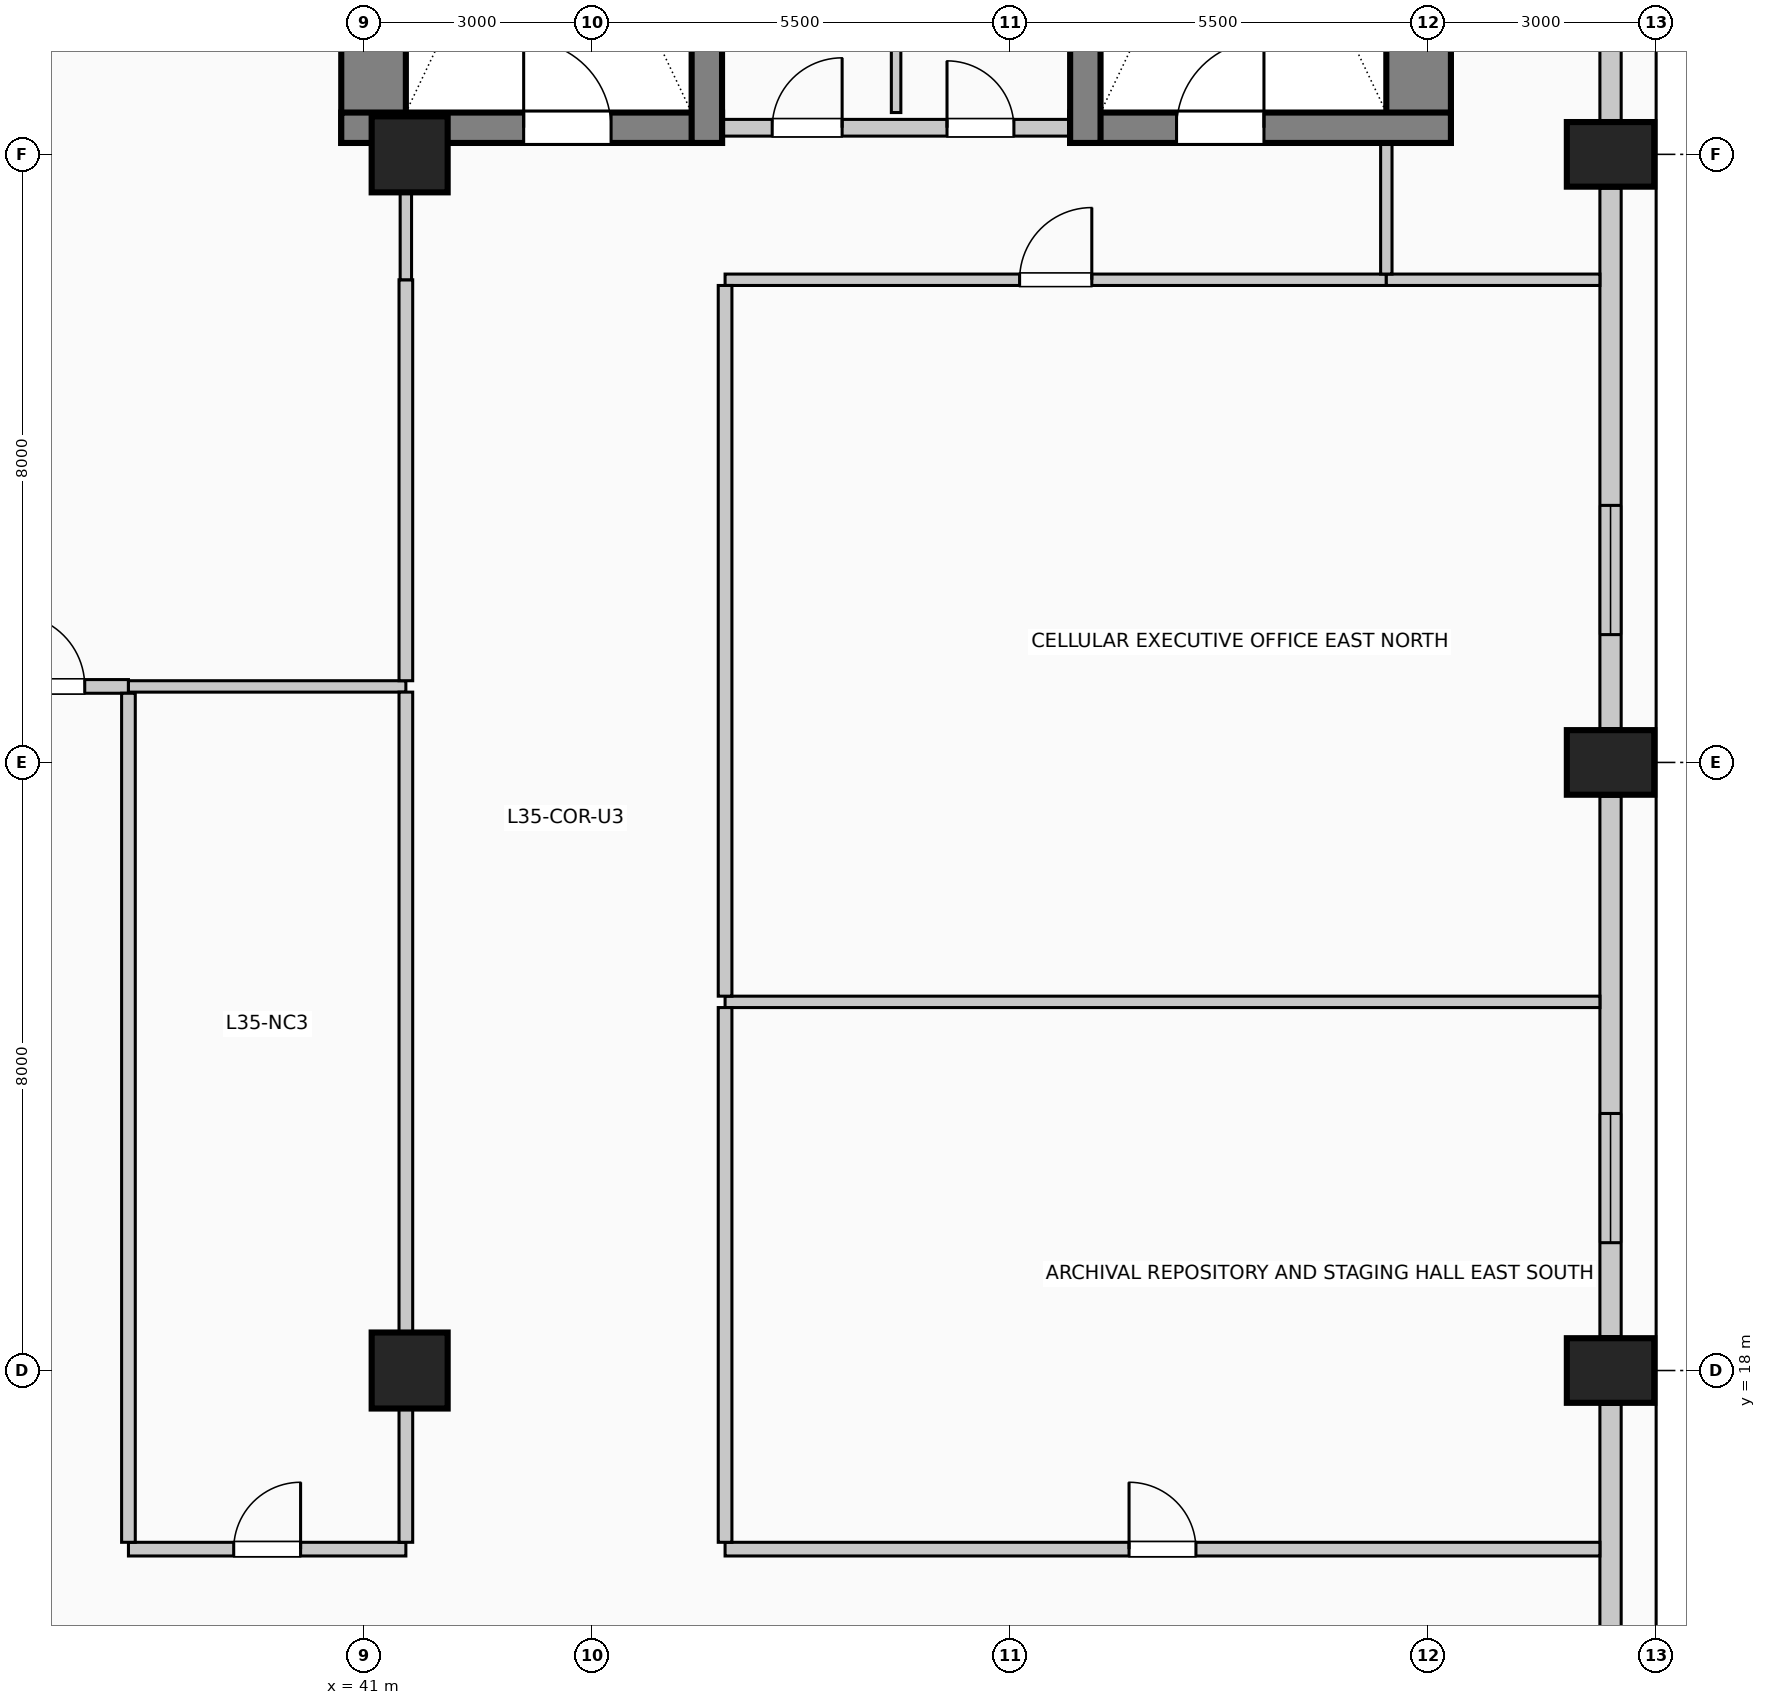
"""IFC4 building model, lengths in metres.
Left out: names, types, materials, properties, quantities, classifications, styles, units other than length and angle.
Written with IfcOpenShell. Run it as: python <this file> out.ifc"""

import sys

from ifc_helpers import new_model, si_unit, direction, frame, frame_2d, origin, origin_2d, place, context, subcontext, project, spatial, rectangle, circle, extrude, element, fill, save


model = new_model("IFC4")
c1 = context("Model", 3, precision=1e-05, world=origin(), true_north=direction((0.0, 1.0)))
c2 = subcontext(c1, "Body", "Model", "MODEL_VIEW")
j1 = project(units=[si_unit("LENGTHUNIT", "METRE"), si_unit("PLANEANGLEUNIT", "RADIAN")], contexts=[c1])
p1 = place(None, origin())
s1 = spatial("IfcSite", under=j1, at=p1, CompositionType="ELEMENT")
p2 = place(p1, origin())
s2 = spatial("IfcBuilding", under=s1, at=p2, CompositionType="ELEMENT")
p3 = place(p2, frame((0.0, 0.0, 144.6)))
s3 = spatial("IfcBuildingStorey", under=s2, at=p3, CompositionType="ELEMENT", Elevation=144.6)
for number, where, z_axis, x_axis in (
    (1, (41.125, 34.15, 0.0), (0.0, 0.0, 1.0), (0.0, 1.0, 0.0)),
    (2, (54.875, 34.15, 0.0), (0.0, 0.0, 1.0), (0.0, 1.0, 0.0)),
):
    element("IfcWall", number, at=place(p3, frame(where, z_axis=z_axis, x_axis=x_axis)), inside=s3, PredefinedType="SHEAR", context=c2, shape_type="SweptSolid", body=[
        extrude(rectangle(XDim=9.13, YDim=0.85, at=frame_2d((4.565, 0.0))), origin(), (0.0, 0.0, 1.0), 4.0),
    ])
p4 = place(p3, frame((40.7, 34.35, 0.0), z_axis=(0.0, 0.0, 1.0), x_axis=(1.0, 0.0, 0.0)))
e3 = element("IfcWall", 3, at=p4, inside=s3, PredefinedType="SHEAR", context=c2, shape_type="SweptSolid", body=[
    extrude(rectangle(XDim=5.01, YDim=0.4, at=frame_2d((2.505, 0.0))), origin(), (0.0, 0.0, 1.0), 4.0),
])
p5 = place(p4, frame((2.4, 0.0, 0.0)))
e4 = element("IfcOpeningElement", 4, at=p5, cuts=e3, PredefinedType="OPENING", context=c2, shape_type="SweptSolid", body=[
    extrude(rectangle(XDim=1.15, YDim=2.2, at=frame_2d((0.575, 1.1))), frame((0.0, 0.21, 0.0), z_axis=(0.0, -1.0, 0.0), x_axis=(1.0, 0.0, 0.0)), (0.0, 0.0, 1.0), 0.42),
])
p6 = place(p3, frame((45.51, 34.15, 0.0), z_axis=(0.0, 0.0, 1.0), x_axis=(0.0, 1.0, 0.0)))
e5 = element("IfcWall", 5, at=p6, inside=s3, PredefinedType="SHEAR", context=c2, shape_type="SweptSolid", body=[
    extrude(rectangle(XDim=9.13, YDim=0.4, at=frame_2d((4.565, 0.0))), origin(), (0.0, 0.0, 1.0), 4.0),
])
p7 = place(p3, frame((50.29, 34.35, 0.0), z_axis=(0.0, 0.0, 1.0), x_axis=(1.0, 0.0, 0.0)))
e6 = element("IfcWall", 6, at=p7, inside=s3, PredefinedType="SHEAR", context=c2, shape_type="SweptSolid", body=[
    extrude(rectangle(XDim=5.01, YDim=0.4, at=frame_2d((2.505, 0.0))), origin(), (0.0, 0.0, 1.0), 4.0),
])
p8 = place(p7, frame((1.4, 0.0, 0.0)))
e7 = element("IfcOpeningElement", 7, at=p8, cuts=e6, PredefinedType="OPENING", context=c2, shape_type="SweptSolid", body=[
    extrude(rectangle(XDim=1.15, YDim=2.2, at=frame_2d((0.575, 1.1))), frame((0.0, 0.21, 0.0), z_axis=(0.0, -1.0, 0.0), x_axis=(1.0, 0.0, 0.0)), (0.0, 0.0, 1.0), 0.42),
])
p9 = place(p3, frame((50.49, 34.15, 0.0), z_axis=(0.0, 0.0, 1.0), x_axis=(0.0, 1.0, 0.0)))
e8 = element("IfcWall", 8, at=p9, inside=s3, PredefinedType="SHEAR", context=c2, shape_type="SweptSolid", body=[
    extrude(rectangle(XDim=9.13, YDim=0.4, at=frame_2d((4.565, 0.0))), origin(), (0.0, 0.0, 1.0), 4.0),
])
for number, where, z_axis, x_axis in (
    (9, (57.4, 18.0, 0.0), (0.0, 0.0, 1.0), (0.0, 1.0, 0.0)),
    (10, (57.4, 26.0, 0.0), (0.0, 0.0, 1.0), (0.0, 1.0, 0.0)),
    (11, (57.4, 34.0, 0.0), (0.0, 0.0, 1.0), (0.0, 1.0, 0.0)),
):
    element("IfcColumn", number, at=place(p3, frame(where, z_axis=z_axis, x_axis=x_axis)), inside=s3, PredefinedType="COLUMN", context=c2, shape_type="SweptSolid", body=[
        extrude(rectangle(XDim=0.85, YDim=1.15, at=origin_2d()), origin(), (0.0, 0.0, 1.0), 4.0),
    ])
for number, where, z_axis, x_axis in (
    (12, (41.6, 18.0, 0.0), (0.0, 0.0, 1.0), (1.0, 0.0, 0.0)),
    (13, (41.6, 34.0, 0.0), (0.0, 0.0, 1.0), (1.0, 0.0, 0.0)),
):
    element("IfcColumn", number, at=place(p3, frame(where, z_axis=z_axis, x_axis=x_axis)), inside=s3, PredefinedType="COLUMN", context=c2, shape_type="SweptSolid", body=[
        extrude(circle(Radius=0.5, at=origin_2d()), origin(), (0.0, 0.0, 1.0), 4.0),
    ])
p10 = place(p3, frame((57.4, 17.555, 0.0), z_axis=(0.0, 0.0, 1.0), x_axis=(0.0, -1.0, 0.0)))
e14 = element("IfcWall", 14, at=p10, inside=s3, PredefinedType="SOLIDWALL", context=c2, shape_type="SweptSolid", body=[
    extrude(rectangle(XDim=7.11, YDim=0.28, at=frame_2d((3.555, 0.0))), origin(), (0.0, 0.0, 1.0), 2.875),
])
p11 = place(p3, frame((57.4, 25.555, 0.0), z_axis=(0.0, 0.0, 1.0), x_axis=(0.0, -1.0, 0.0)))
e15 = element("IfcWall", 15, at=p11, inside=s3, PredefinedType="SOLIDWALL", context=c2, shape_type="SweptSolid", body=[
    extrude(rectangle(XDim=7.11, YDim=0.28, at=frame_2d((3.555, 0.0))), origin(), (0.0, 0.0, 1.0), 2.875),
])
p12 = place(p11, frame((4.173, 0.0, 0.5)))
e16 = element("IfcOpeningElement", 16, at=p12, cuts=e15, PredefinedType="OPENING", context=c2, shape_type="SweptSolid", body=[
    extrude(rectangle(XDim=1.7, YDim=1.95, at=frame_2d((0.85, 0.975))), frame((0.0, 0.15, 0.0), z_axis=(0.0, -1.0, 0.0), x_axis=(1.0, 0.0, 0.0)), (0.0, 0.0, 1.0), 0.3),
])
p13 = place(p3, frame((57.4, 33.555, 0.0), z_axis=(0.0, 0.0, 1.0), x_axis=(0.0, -1.0, 0.0)))
e17 = element("IfcWall", 17, at=p13, inside=s3, PredefinedType="SOLIDWALL", context=c2, shape_type="SweptSolid", body=[
    extrude(rectangle(XDim=7.11, YDim=0.28, at=frame_2d((3.555, 0.0))), origin(), (0.0, 0.0, 1.0), 2.875),
])
p14 = place(p13, frame((4.173, 0.0, 0.5)))
e18 = element("IfcOpeningElement", 18, at=p14, cuts=e17, PredefinedType="OPENING", context=c2, shape_type="SweptSolid", body=[
    extrude(rectangle(XDim=1.7, YDim=1.95, at=frame_2d((0.85, 0.975))), frame((0.0, 0.15, 0.0), z_axis=(0.0, -1.0, 0.0), x_axis=(1.0, 0.0, 0.0)), (0.0, 0.0, 1.0), 0.3),
])
p15 = place(p3, frame((57.4, 41.955, 0.0), z_axis=(0.0, 0.0, 1.0), x_axis=(0.0, -1.0, 0.0)))
e19 = element("IfcWall", 19, at=p15, inside=s3, PredefinedType="SOLIDWALL", context=c2, shape_type="SweptSolid", body=[
    extrude(rectangle(XDim=7.51, YDim=0.28, at=frame_2d((3.755, 0.0))), origin(), (0.0, 0.0, 1.0), 2.875),
])
p16 = place(p3, frame((45.72, 34.35, 0.0), z_axis=(0.0, 0.0, 1.0), x_axis=(1.0, 0.0, 0.0)))
e20 = element("IfcWall", 20, at=p16, inside=s3, PredefinedType="PARTITIONING", context=c2, shape_type="SweptSolid", body=[
    extrude(rectangle(XDim=4.56, YDim=0.22, at=frame_2d((2.28, 0.0))), origin(), (0.0, 0.0, 1.0), 3.725),
])
p17 = place(p16, frame((0.65, 0.0, 0.0)))
e21 = element("IfcOpeningElement", 21, at=p17, cuts=e20, PredefinedType="OPENING", context=c2, shape_type="SweptSolid", body=[
    extrude(rectangle(XDim=0.92, YDim=2.1, at=frame_2d((0.46, 1.05))), frame((0.0, 0.12, 0.0), z_axis=(0.0, -1.0, 0.0), x_axis=(1.0, 0.0, 0.0)), (0.0, 0.0, 1.0), 0.24),
])
p18 = place(p16, frame((2.95, 0.0, 0.0)))
e22 = element("IfcOpeningElement", 22, at=p18, cuts=e20, PredefinedType="OPENING", context=c2, shape_type="SweptSolid", body=[
    extrude(rectangle(XDim=0.88, YDim=2.1, at=frame_2d((0.44, 1.05))), frame((0.0, 0.12, 0.0), z_axis=(0.0, -1.0, 0.0), x_axis=(1.0, 0.0, 0.0)), (0.0, 0.0, 1.0), 0.24),
])
p19 = place(p3, frame((37.9, 15.65, 0.0), z_axis=(0.0, 0.0, 1.0), x_axis=(1.0, 0.0, 0.0)))
e23 = element("IfcWall", 23, at=p19, inside=s3, PredefinedType="PARTITIONING", context=c2, shape_type="SweptSolid", body=[
    extrude(rectangle(XDim=3.65, YDim=0.18, at=frame_2d((1.825, 0.0))), origin(), (0.0, 0.0, 1.0), 3.725),
])
p20 = place(p19, frame((1.385, 0.0, 0.0)))
e24 = element("IfcOpeningElement", 24, at=p20, cuts=e23, PredefinedType="OPENING", context=c2, shape_type="SweptSolid", body=[
    extrude(rectangle(XDim=0.88, YDim=2.1, at=frame_2d((0.44, 1.05))), frame((0.0, 0.1, 0.0), z_axis=(0.0, -1.0, 0.0), x_axis=(1.0, 0.0, 0.0)), (0.0, 0.0, 1.0), 0.2),
])
p21 = place(p3, frame((45.75, 15.65, 0.0), z_axis=(0.0, 0.0, 1.0), x_axis=(1.0, 0.0, 0.0)))
e25 = element("IfcWall", 25, at=p21, inside=s3, PredefinedType="PARTITIONING", context=c2, shape_type="SweptSolid", body=[
    extrude(rectangle(XDim=11.51, YDim=0.18, at=frame_2d((5.755, 0.0))), origin(), (0.0, 0.0, 1.0), 3.725),
])
p22 = place(p21, frame((5.315, 0.0, 0.0)))
e26 = element("IfcOpeningElement", 26, at=p22, cuts=e25, PredefinedType="OPENING", context=c2, shape_type="SweptSolid", body=[
    extrude(rectangle(XDim=0.88, YDim=2.1, at=frame_2d((0.44, 1.05))), frame((0.0, 0.1, 0.0), z_axis=(0.0, -1.0, 0.0), x_axis=(1.0, 0.0, 0.0)), (0.0, 0.0, 1.0), 0.2),
])
p23 = place(p3, frame((45.75, 22.85, 0.0), z_axis=(0.0, 0.0, 1.0), x_axis=(1.0, 0.0, 0.0)))
e27 = element("IfcWall", 27, at=p23, inside=s3, PredefinedType="PARTITIONING", context=c2, shape_type="SweptSolid", body=[
    extrude(rectangle(XDim=11.51, YDim=0.15, at=frame_2d((5.755, 0.0))), origin(), (0.0, 0.0, 1.0), 3.725),
])
p24 = place(p3, frame((35.8, 27.0, 0.0), z_axis=(0.0, 0.0, 1.0), x_axis=(1.0, 0.0, 0.0)))
e28 = element("IfcWall", 28, at=p24, inside=s3, PredefinedType="PARTITIONING", context=c2, shape_type="SweptSolid", body=[
    extrude(rectangle(XDim=2.1, YDim=0.18, at=frame_2d((1.05, 0.0))), origin(), (0.0, 0.0, 1.0), 3.725),
])
p25 = place(p24, frame((0.575, 0.0, 0.0)))
e29 = element("IfcOpeningElement", 29, at=p25, cuts=e28, PredefinedType="OPENING", context=c2, shape_type="SweptSolid", body=[
    extrude(rectangle(XDim=0.95, YDim=2.15, at=frame_2d((0.475, 1.075))), frame((0.0, 0.1, 0.0), z_axis=(0.0, -1.0, 0.0), x_axis=(1.0, 0.0, 0.0)), (0.0, 0.0, 1.0), 0.2),
])
p26 = place(p3, frame((37.9, 27.0, 0.0), z_axis=(0.0, 0.0, 1.0), x_axis=(1.0, 0.0, 0.0)))
e30 = element("IfcWall", 30, at=p26, inside=s3, PredefinedType="PARTITIONING", context=c2, shape_type="SweptSolid", body=[
    extrude(rectangle(XDim=3.65, YDim=0.15, at=frame_2d((1.825, 0.0))), origin(), (0.0, 0.0, 1.0), 3.725),
])
p27 = place(p3, frame((45.75, 32.35, 0.0), z_axis=(0.0, 0.0, 1.0), x_axis=(1.0, 0.0, 0.0)))
e31 = element("IfcWall", 31, at=p27, inside=s3, PredefinedType="PARTITIONING", context=c2, shape_type="SweptSolid", body=[
    extrude(rectangle(XDim=8.7, YDim=0.15, at=frame_2d((4.35, 0.0))), origin(), (0.0, 0.0, 1.0), 3.725),
])
p28 = place(p27, frame((3.875, 0.0, 0.0)))
e32 = element("IfcOpeningElement", 32, at=p28, cuts=e31, PredefinedType="OPENING", context=c2, shape_type="SweptSolid", body=[
    extrude(rectangle(XDim=0.95, YDim=2.15, at=frame_2d((0.475, 1.075))), frame((0.0, 0.085, 0.0), z_axis=(0.0, -1.0, 0.0), x_axis=(1.0, 0.0, 0.0)), (0.0, 0.0, 1.0), 0.17),
])
p29 = place(p3, frame((54.45, 32.35, 0.0), z_axis=(0.0, 0.0, 1.0), x_axis=(1.0, 0.0, 0.0)))
e33 = element("IfcWall", 33, at=p29, inside=s3, PredefinedType="PARTITIONING", context=c2, shape_type="SweptSolid", body=[
    extrude(rectangle(XDim=2.81, YDim=0.15, at=frame_2d((1.405, 0.0))), origin(), (0.0, 0.0, 1.0), 3.725),
])
p30 = place(p3, frame((37.9, 15.74, 0.0), z_axis=(0.0, 0.0, 1.0), x_axis=(0.0, 1.0, 0.0)))
e34 = element("IfcWall", 34, at=p30, inside=s3, PredefinedType="PARTITIONING", context=c2, shape_type="SweptSolid", body=[
    extrude(rectangle(XDim=11.17, YDim=0.18, at=frame_2d((5.585, 0.0))), origin(), (0.0, 0.0, 1.0), 3.725),
])
p31 = place(p3, frame((41.55, 15.74, 0.0), z_axis=(0.0, 0.0, 1.0), x_axis=(0.0, 1.0, 0.0)))
e35 = element("IfcWall", 35, at=p31, inside=s3, PredefinedType="PARTITIONING", context=c2, shape_type="SweptSolid", body=[
    extrude(rectangle(XDim=1.76, YDim=0.18, at=frame_2d((0.88, 0.0))), origin(), (0.0, 0.0, 1.0), 3.07),
])
p32 = place(p3, frame((41.55, 18.5, 0.0), z_axis=(0.0, 0.0, 1.0), x_axis=(0.0, 1.0, 0.0)))
e36 = element("IfcWall", 36, at=p32, inside=s3, PredefinedType="PARTITIONING", context=c2, shape_type="SweptSolid", body=[
    extrude(rectangle(XDim=8.425, YDim=0.18, at=frame_2d((4.212, 0.0))), origin(), (0.0, 0.0, 1.0), 3.07),
])
p33 = place(p3, frame((41.55, 27.075, 0.0), z_axis=(0.0, 0.0, 1.0), x_axis=(0.0, 1.0, 0.0)))
e37 = element("IfcWall", 37, at=p33, inside=s3, PredefinedType="PARTITIONING", context=c2, shape_type="SweptSolid", body=[
    extrude(rectangle(XDim=5.275, YDim=0.18, at=frame_2d((2.638, 0.0))), origin(), (0.0, 0.0, 1.0), 3.07),
])
p34 = place(p3, frame((41.55, 32.35, 0.0), z_axis=(0.0, 0.0, 1.0), x_axis=(0.0, 1.0, 0.0)))
e38 = element("IfcWall", 38, at=p34, inside=s3, PredefinedType="PARTITIONING", context=c2, shape_type="SweptSolid", body=[
    extrude(rectangle(XDim=1.15, YDim=0.15, at=frame_2d((0.575, 0.0))), origin(), (0.0, 0.0, 1.0), 3.07),
])
p35 = place(p3, frame((45.75, 15.74, 0.0), z_axis=(0.0, 0.0, 1.0), x_axis=(0.0, 1.0, 0.0)))
e39 = element("IfcWall", 39, at=p35, inside=s3, PredefinedType="PARTITIONING", context=c2, shape_type="SweptSolid", body=[
    extrude(rectangle(XDim=7.035, YDim=0.18, at=frame_2d((3.518, 0.0))), origin(), (0.0, 0.0, 1.0), 3.725),
])
p36 = place(p3, frame((45.75, 22.925, 0.0), z_axis=(0.0, 0.0, 1.0), x_axis=(0.0, 1.0, 0.0)))
e40 = element("IfcWall", 40, at=p36, inside=s3, PredefinedType="PARTITIONING", context=c2, shape_type="SweptSolid", body=[
    extrude(rectangle(XDim=9.35, YDim=0.18, at=frame_2d((4.675, 0.0))), origin(), (0.0, 0.0, 1.0), 3.725),
])
p37 = place(p3, frame((48.0, 34.55, 0.0), z_axis=(0.0, 0.0, 1.0), x_axis=(0.0, 1.0, 0.0)))
e41 = element("IfcWall", 41, at=p37, inside=s3, PredefinedType="PARTITIONING", context=c2, shape_type="SweptSolid", body=[
    extrude(rectangle(XDim=7.475, YDim=0.125, at=frame_2d((3.737, 0.0))), origin(), (0.0, 0.0, 1.0), 3.725),
])
p38 = place(p3, frame((54.45, 32.425, 0.0), z_axis=(0.0, 0.0, 1.0), x_axis=(0.0, 1.0, 0.0)))
e42 = element("IfcWall", 42, at=p38, inside=s3, PredefinedType="PARTITIONING", context=c2, shape_type="SweptSolid", body=[
    extrude(rectangle(XDim=1.725, YDim=0.15, at=frame_2d((0.862, 0.0))), origin(), (0.0, 0.0, 1.0), 3.725),
])
p39 = place(p12, origin())
e43 = element("IfcWindow", 43, at=p39, inside=s3, PartitioningType="SINGLE_PANEL", PredefinedType="WINDOW", context=c2, shape_type="SweptSolid", body=[
    extrude(rectangle(XDim=1.7, YDim=1.95, at=frame_2d((0.85, 0.975))), frame((0.0, 0.03, 0.0), z_axis=(0.0, -1.0, 0.0), x_axis=(1.0, 0.0, 0.0)), (0.0, 0.0, 1.0), 0.06),
])
fill(e16, e43)
p40 = place(p14, origin())
e44 = element("IfcWindow", 44, at=p40, inside=s3, PartitioningType="SINGLE_PANEL", PredefinedType="WINDOW", context=c2, shape_type="SweptSolid", body=[
    extrude(rectangle(XDim=1.7, YDim=1.95, at=frame_2d((0.85, 0.975))), frame((0.0, 0.03, 0.0), z_axis=(0.0, -1.0, 0.0), x_axis=(1.0, 0.0, 0.0)), (0.0, 0.0, 1.0), 0.06),
])
fill(e18, e44)
p41 = place(p5, origin())
e45 = element("IfcDoor", 45, at=p41, inside=s3, OperationType="SINGLE_SWING_LEFT", PredefinedType="DOOR", context=c2, shape_type="SweptSolid", body=[
    extrude(rectangle(XDim=1.15, YDim=2.2, at=frame_2d((0.575, 1.1))), frame((0.0, 0.025, 0.0), z_axis=(0.0, -1.0, 0.0), x_axis=(1.0, 0.0, 0.0)), (0.0, 0.0, 1.0), 0.05),
])
fill(e4, e45)
p42 = place(p17, origin())
e46 = element("IfcDoor", 46, at=p42, inside=s3, OperationType="SINGLE_SWING_RIGHT", PredefinedType="DOOR", context=c2, shape_type="SweptSolid", body=[
    extrude(rectangle(XDim=0.92, YDim=2.1, at=frame_2d((0.46, 1.05))), frame((0.0, 0.025, 0.0), z_axis=(0.0, -1.0, 0.0), x_axis=(1.0, 0.0, 0.0)), (0.0, 0.0, 1.0), 0.05),
])
fill(e21, e46)
p43 = place(p18, origin())
e47 = element("IfcDoor", 47, at=p43, inside=s3, OperationType="SINGLE_SWING_LEFT", PredefinedType="DOOR", context=c2, shape_type="SweptSolid", body=[
    extrude(rectangle(XDim=0.88, YDim=2.1, at=frame_2d((0.44, 1.05))), frame((0.0, 0.025, 0.0), z_axis=(0.0, -1.0, 0.0), x_axis=(1.0, 0.0, 0.0)), (0.0, 0.0, 1.0), 0.05),
])
fill(e22, e47)
p44 = place(p8, origin())
e48 = element("IfcDoor", 48, at=p44, inside=s3, OperationType="SINGLE_SWING_RIGHT", PredefinedType="DOOR", context=c2, shape_type="SweptSolid", body=[
    extrude(rectangle(XDim=1.15, YDim=2.2, at=frame_2d((0.575, 1.1))), frame((0.0, 0.025, 0.0), z_axis=(0.0, -1.0, 0.0), x_axis=(1.0, 0.0, 0.0)), (0.0, 0.0, 1.0), 0.05),
])
fill(e7, e48)
p45 = place(p20, origin())
e49 = element("IfcDoor", 49, at=p45, inside=s3, OperationType="SINGLE_SWING_RIGHT", PredefinedType="DOOR", context=c2, shape_type="SweptSolid", body=[
    extrude(rectangle(XDim=0.88, YDim=2.1, at=frame_2d((0.44, 1.05))), frame((0.0, 0.025, 0.0), z_axis=(0.0, -1.0, 0.0), x_axis=(1.0, 0.0, 0.0)), (0.0, 0.0, 1.0), 0.05),
])
fill(e24, e49)
p46 = place(p22, origin())
e50 = element("IfcDoor", 50, at=p46, inside=s3, OperationType="SINGLE_SWING_LEFT", PredefinedType="DOOR", context=c2, shape_type="SweptSolid", body=[
    extrude(rectangle(XDim=0.88, YDim=2.1, at=frame_2d((0.44, 1.05))), frame((0.0, 0.025, 0.0), z_axis=(0.0, -1.0, 0.0), x_axis=(1.0, 0.0, 0.0)), (0.0, 0.0, 1.0), 0.05),
])
fill(e26, e50)
p47 = place(p25, origin())
e51 = element("IfcDoor", 51, at=p47, inside=s3, OperationType="SINGLE_SWING_LEFT", PredefinedType="DOOR", context=c2, shape_type="SweptSolid", body=[
    extrude(rectangle(XDim=0.95, YDim=2.15, at=frame_2d((0.475, 1.075))), frame((0.0, 0.025, 0.0), z_axis=(0.0, -1.0, 0.0), x_axis=(1.0, 0.0, 0.0)), (0.0, 0.0, 1.0), 0.05),
])
fill(e29, e51)
p48 = place(p28, origin())
e52 = element("IfcDoor", 52, at=p48, inside=s3, OperationType="SINGLE_SWING_RIGHT", PredefinedType="DOOR", context=c2, shape_type="SweptSolid", body=[
    extrude(rectangle(XDim=0.95, YDim=2.15, at=frame_2d((0.475, 1.075))), frame((0.0, 0.025, 0.0), z_axis=(0.0, -1.0, 0.0), x_axis=(1.0, 0.0, 0.0)), (0.0, 0.0, 1.0), 0.05),
])
fill(e32, e52)
save(model, sys.argv[1])
